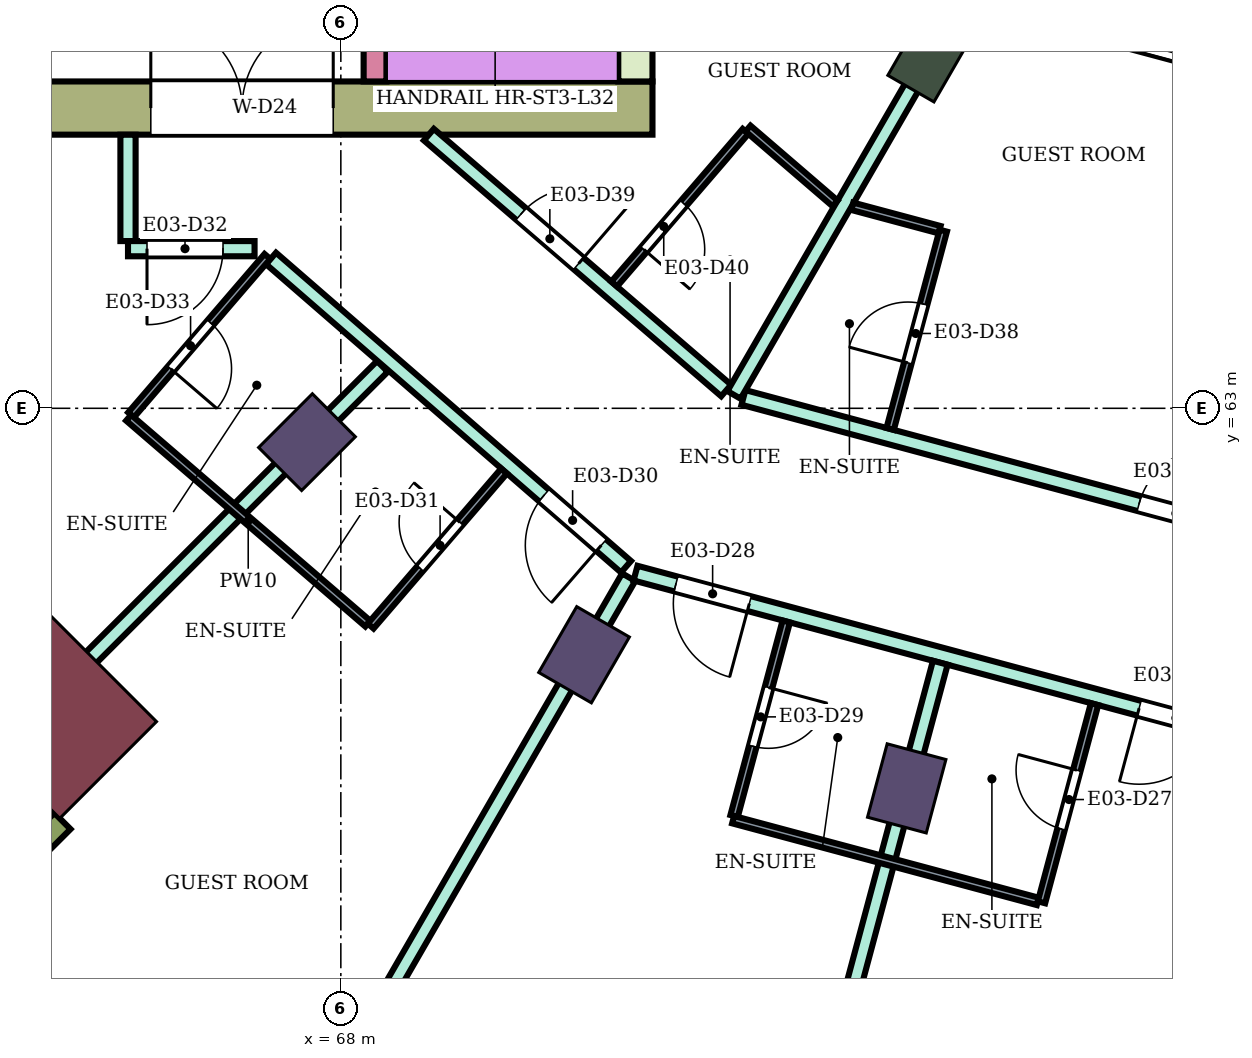
"""IFC4 building model, lengths in metres.
Left out: names, types, materials, properties, quantities, classifications, styles, units other than length and angle.
Written with IfcOpenShell. Run it as: python <this file> out.ifc"""

import sys

from ifc_helpers import new_model, si_unit, direction, frame, frame_2d, origin, origin_2d, place, context, subcontext, project, spatial, rectangle, extrude, element, fill, save


model = new_model("IFC4")
c1 = context("Model", 3, precision=1e-05, world=origin(), true_north=direction((0.0, 1.0)))
c2 = subcontext(c1, "Body", "Model", "MODEL_VIEW")
j1 = project(units=[si_unit("LENGTHUNIT", "METRE"), si_unit("PLANEANGLEUNIT", "RADIAN")], contexts=[c1])
p1 = place(None, origin())
s1 = spatial("IfcSite", under=j1, at=p1, CompositionType="ELEMENT")
p2 = place(p1, origin())
s2 = spatial("IfcBuilding", under=s1, at=p2, CompositionType="ELEMENT")
p3 = place(p2, frame((0.0, 0.0, 138.0)))
s3 = spatial("IfcBuildingStorey", under=s2, at=p3, CompositionType="ELEMENT", Elevation=138.0)
for number, where, z_axis, x_axis in (
    (1, (67.555, 62.555, 0.0), (0.0, 0.0, 1.0), (-0.707, -0.707, 0.0)),
    (2, (71.2, 59.758, 0.0), (0.0, 0.0, 1.0), (-0.5, -0.866, 0.0)),
    (3, (75.445, 58.0, 0.0), (0.0, 0.0, 1.0), (-0.259, -0.966, 0.0)),
):
    element("IfcColumn", number, at=place(p3, frame(where, z_axis=z_axis, x_axis=x_axis)), inside=s3, PredefinedType="COLUMN", context=c2, shape_type="SweptSolid", body=[
        extrude(rectangle(XDim=1.0, YDim=0.8, at=origin_2d()), origin(), (0.0, 0.0, 1.0), 3.9),
    ])
p4 = place(p3, frame((75.7, 67.552, 0.0), z_axis=(0.0, 0.0, 1.0), x_axis=(-0.5, -0.866025403784, 0.0)))
e4 = element("IfcColumn", 4, at=p4, inside=s3, PredefinedType="COLUMN", context=c2, shape_type="SweptSolid", body=[
    extrude(rectangle(XDim=0.8, YDim=0.7, at=origin_2d()), origin(), (0.0, 0.0, 1.0), 3.9),
])
p5 = place(p3, frame((64.09, 59.09, 0.0), z_axis=(0.0, 0.0, 1.0), x_axis=(-0.707106781187, -0.707106781187, 0.0)))
e5 = element("IfcColumn", 5, at=p5, inside=s3, PredefinedType="COLUMN", context=c2, shape_type="SweptSolid", body=[
    extrude(rectangle(XDim=1.8, YDim=2.4, at=origin_2d()), origin(), (0.0, 0.0, 1.0), 3.9),
])
p6 = place(p3, frame((72.1, 66.95, 0.0), z_axis=(0.0, 0.0, 1.0), x_axis=(-1.0, 0.0, 0.0)))
e6 = element("IfcWall", 6, at=p6, inside=s3, PredefinedType="SHEAR", context=c2, shape_type="SweptSolid", body=[
    extrude(rectangle(XDim=14.8, YDim=0.7, at=frame_2d((7.4, 0.0))), origin(), (0.0, 0.0, 1.0), 3.58),
])
p7 = place(p6, frame((4.2, 0.0, 0.0)))
e7 = element("IfcOpeningElement", 7, at=p7, cuts=e6, PredefinedType="OPENING", context=c2, shape_type="SweptSolid", body=[
    extrude(rectangle(XDim=2.4, YDim=2.4, at=frame_2d((1.2, 1.2))), frame((0.0, 0.36, 0.0), z_axis=(0.0, -1.0, 0.0), x_axis=(1.0, 0.0, 0.0)), (0.0, 0.0, 1.0), 0.72),
])
p8 = place(p3, frame((71.875, 75.0, 0.0), z_axis=(0.0, 0.0, 1.0), x_axis=(0.0, -1.0, 0.0)))
e8 = element("IfcWall", 8, at=p8, inside=s3, PredefinedType="SHEAR", context=c2, shape_type="SweptSolid", body=[
    extrude(rectangle(XDim=7.7, YDim=0.45, at=frame_2d((3.85, 0.0))), origin(), (0.0, 0.0, 1.0), 3.58),
])
p9 = place(p3, frame((68.45, 75.0, 0.0), z_axis=(0.0, 0.0, 1.0), x_axis=(0.0, -1.0, 0.0)))
e9 = element("IfcWall", 9, at=p9, inside=s3, PredefinedType="SHEAR", context=c2, shape_type="SweptSolid", body=[
    extrude(rectangle(XDim=7.7, YDim=0.3, at=frame_2d((3.85, 0.0))), origin(), (0.0, 0.0, 1.0), 3.58),
])
p10 = place(p9, frame((1.85, 0.0, 0.0)))
e10 = element("IfcOpeningElement", 10, at=p10, cuts=e9, PredefinedType="OPENING", context=c2, shape_type="SweptSolid", body=[
    extrude(rectangle(XDim=0.9, YDim=2.1, at=frame_2d((0.45, 1.05))), frame((0.0, 0.16, 0.0), z_axis=(0.0, -1.0, 0.0), x_axis=(1.0, 0.0, 0.0)), (0.0, 0.0, 1.0), 0.32),
])
p11 = place(p3, frame((64.338, 57.57, 0.0), z_axis=(0.0, 0.0, 1.0), x_axis=(-0.707106781187, -0.707106781187, 0.0)))
e11 = element("IfcWall", 11, at=p11, inside=s3, PredefinedType="NOTDEFINED", context=c2, shape_type="SweptSolid", body=[
    extrude(rectangle(XDim=2.416, YDim=0.3, at=frame_2d((1.208, 0.0))), origin(), (0.0, 0.0, 1.0), 3.9),
])
p12 = place(p3, frame((76.198, 68.415, 0.0), z_axis=(0.0, 0.0, 1.0), x_axis=(0.965933654434, -0.258789828301, 0.0)))
e12 = element("IfcWall", 12, at=p12, inside=s3, PredefinedType="NOTDEFINED", context=c2, shape_type="SweptSolid", body=[
    extrude(rectangle(XDim=3.936, YDim=0.2, at=frame_2d((1.968, 0.0))), origin(), (0.0, 0.0, 1.0), 3.9),
])
p13 = place(p12, frame((0.468, 0.0, 0.9)))
e13 = element("IfcOpeningElement", 13, at=p13, cuts=e12, PredefinedType="OPENING", context=c2, shape_type="SweptSolid", body=[
    extrude(rectangle(XDim=3.0, YDim=2.3, at=frame_2d((1.5, 1.15))), frame((0.0, 0.11, 0.0), z_axis=(0.0, -1.0, 0.0), x_axis=(1.0, 0.0, 0.0)), (0.0, 0.0, 1.0), 0.22),
])
p14 = place(p3, frame((63.593, 58.599, 0.0), z_axis=(0.0, 0.0, 1.0), x_axis=(0.707228748718, 0.706984792613, 0.0)))
e14 = element("IfcWall", 14, at=p14, inside=s3, PredefinedType="PARTITIONING", context=c2, shape_type="SweptSolid", body=[
    extrude(rectangle(XDim=7.005, YDim=0.2, at=frame_2d((3.503, 0.0))), origin(), (0.0, 0.0, 1.0), 3.45),
])
p15 = place(p3, frame((65.2, 65.2, 0.0), z_axis=(0.0, 0.0, 1.0), x_axis=(0.0, 1.0, 0.0)))
e15 = element("IfcWall", 15, at=p15, inside=s3, PredefinedType="PARTITIONING", context=c2, shape_type="SweptSolid", body=[
    extrude(rectangle(XDim=1.399, YDim=0.2, at=frame_2d((0.7, 0.0))), origin(), (0.0, 0.0, 1.0), 3.45),
])
p16 = place(p3, frame((65.2, 65.1, 0.0), z_axis=(0.0, 0.0, 1.0), x_axis=(1.0, 0.0, 0.0)))
e16 = element("IfcWall", 16, at=p16, inside=s3, PredefinedType="PARTITIONING", context=c2, shape_type="SweptSolid", body=[
    extrude(rectangle(XDim=1.665, YDim=0.2, at=frame_2d((0.833, 0.0))), origin(), (0.0, 0.0, 1.0), 3.45),
])
p17 = place(p16, frame((0.25, 0.0, 0.0)))
e17 = element("IfcOpeningElement", 17, at=p17, cuts=e16, PredefinedType="OPENING", context=c2, shape_type="SweptSolid", body=[
    extrude(rectangle(XDim=1.0, YDim=2.1, at=frame_2d((0.5, 1.05))), frame((0.0, 0.11, 0.0), z_axis=(0.0, -1.0, 0.0), x_axis=(1.0, 0.0, 0.0)), (0.0, 0.0, 1.0), 0.22),
])
p18 = place(p3, frame((67.082, 64.972, 0.0), z_axis=(0.0, 0.0, 1.0), x_axis=(0.755031061605, -0.65568902386, 0.0)))
e18 = element("IfcWall", 18, at=p18, inside=s3, PredefinedType="PARTITIONING", context=c2, shape_type="SweptSolid", body=[
    extrude(rectangle(XDim=6.186, YDim=0.2, at=frame_2d((3.093, 0.0))), origin(), (0.0, 0.0, 1.0), 3.45),
])
p19 = place(p18, frame((4.755, 0.0, 0.0)))
e19 = element("IfcOpeningElement", 19, at=p19, cuts=e18, PredefinedType="OPENING", context=c2, shape_type="SweptSolid", body=[
    extrude(rectangle(XDim=1.0, YDim=2.1, at=frame_2d((0.5, 1.05))), frame((0.0, 0.11, 0.0), z_axis=(0.0, -1.0, 0.0), x_axis=(1.0, 0.0, 0.0)), (0.0, 0.0, 1.0), 0.22),
])
p20 = place(p3, frame((67.097, 52.661, 0.0), z_axis=(0.0, 0.0, 1.0), x_axis=(0.500236379769, 0.865888886841, 0.0)))
e20 = element("IfcWall", 20, at=p20, inside=s3, PredefinedType="PARTITIONING", context=c2, shape_type="SweptSolid", body=[
    extrude(rectangle(XDim=9.375, YDim=0.2, at=frame_2d((4.688, 0.0))), origin(), (0.0, 0.0, 1.0), 3.45),
])
p21 = place(p3, frame((69.158, 66.6, 0.0), z_axis=(0.0, 0.0, 1.0), x_axis=(0.757976058094, -0.652282373943, 0.0)))
e21 = element("IfcWall", 21, at=p21, inside=s3, PredefinedType="PARTITIONING", context=c2, shape_type="SweptSolid", body=[
    extrude(rectangle(XDim=5.16, YDim=0.2, at=frame_2d((2.58, 0.0))), origin(), (0.0, 0.0, 1.0), 3.45),
])
p22 = place(p21, frame((1.6, 0.0, 0.0)))
e22 = element("IfcOpeningElement", 22, at=p22, cuts=e21, PredefinedType="OPENING", context=c2, shape_type="SweptSolid", body=[
    extrude(rectangle(XDim=1.0, YDim=2.1, at=frame_2d((0.5, 1.05))), frame((0.0, 0.11, 0.0), z_axis=(0.0, -1.0, 0.0), x_axis=(1.0, 0.0, 0.0)), (0.0, 0.0, 1.0), 0.22),
])
p23 = place(p3, frame((71.877, 60.832, 0.0), z_axis=(0.0, 0.0, 1.0), x_axis=(0.965852509869, -0.259092510851, 0.0)))
e23 = element("IfcWall", 23, at=p23, inside=s3, PredefinedType="PARTITIONING", context=c2, shape_type="SweptSolid", body=[
    extrude(rectangle(XDim=8.32, YDim=0.2, at=frame_2d((4.16, 0.0))), origin(), (0.0, 0.0, 1.0), 3.45),
])
p24 = place(p23, frame((6.86, 0.0, 0.0)))
e24 = element("IfcOpeningElement", 24, at=p24, cuts=e23, PredefinedType="OPENING", context=c2, shape_type="SweptSolid", body=[
    extrude(rectangle(XDim=1.0, YDim=2.1, at=frame_2d((0.5, 1.05))), frame((0.0, 0.11, 0.0), z_axis=(0.0, -1.0, 0.0), x_axis=(1.0, 0.0, 0.0)), (0.0, 0.0, 1.0), 0.22),
])
p25 = place(p23, frame((0.55, 0.0, 0.0)))
e25 = element("IfcOpeningElement", 25, at=p25, cuts=e23, PredefinedType="OPENING", context=c2, shape_type="SweptSolid", body=[
    extrude(rectangle(XDim=1.0, YDim=2.1, at=frame_2d((0.5, 1.05))), frame((0.0, 0.11, 0.0), z_axis=(0.0, -1.0, 0.0), x_axis=(1.0, 0.0, 0.0)), (0.0, 0.0, 1.0), 0.22),
])
p26 = place(p3, frame((73.297, 63.143, 0.0), z_axis=(0.0, 0.0, 1.0), x_axis=(0.965859030528, -0.25906820173, 0.0)))
e26 = element("IfcWall", 26, at=p26, inside=s3, PredefinedType="PARTITIONING", context=c2, shape_type="SweptSolid", body=[
    extrude(rectangle(XDim=6.81, YDim=0.2, at=frame_2d((3.405, 0.0))), origin(), (0.0, 0.0, 1.0), 3.45),
])
p27 = place(p26, frame((5.39, 0.0, 0.0)))
e27 = element("IfcOpeningElement", 27, at=p27, cuts=e26, PredefinedType="OPENING", context=c2, shape_type="SweptSolid", body=[
    extrude(rectangle(XDim=1.0, YDim=2.1, at=frame_2d((0.5, 1.05))), frame((0.0, 0.11, 0.0), z_axis=(0.0, -1.0, 0.0), x_axis=(1.0, 0.0, 0.0)), (0.0, 0.0, 1.0), 0.22),
])
p28 = place(p3, frame((73.173, 63.176, 0.0), z_axis=(0.0, 0.0, 1.0), x_axis=(0.500239348149, 0.865887171959, 0.0)))
e28 = element("IfcWall", 28, at=p28, inside=s3, PredefinedType="PARTITIONING", context=c2, shape_type="SweptSolid", body=[
    extrude(rectangle(XDim=5.955, YDim=0.2, at=frame_2d((2.978, 0.0))), origin(), (0.0, 0.0, 1.0), 3.45),
])
p29 = place(p3, frame((73.321, 50.081, 0.0), z_axis=(0.0, 0.0, 1.0), x_axis=(0.258889198551, 0.965907025999, 0.0)))
e29 = element("IfcWall", 29, at=p29, inside=s3, PredefinedType="PARTITIONING", context=c2, shape_type="SweptSolid", body=[
    extrude(rectangle(XDim=9.909, YDim=0.2, at=frame_2d((4.955, 0.0))), origin(), (0.0, 0.0, 1.0), 3.45),
])
p30 = place(p3, frame((65.24, 62.913, 0.0), z_axis=(0.0, 0.0, 1.0), x_axis=(0.652069888227, 0.758158862553, 0.0)))
e30 = element("IfcWall", 30, at=p30, inside=s3, PredefinedType="PARTITIONING", context=c2, shape_type="SweptSolid", body=[
    extrude(rectangle(XDim=2.75, YDim=0.1, at=frame_2d((1.375, 0.0))), origin(), (0.0, 0.0, 1.0), 3.45),
])
p31 = place(p30, frame((0.8, 0.0, 0.0)))
e31 = element("IfcOpeningElement", 31, at=p31, cuts=e30, PredefinedType="OPENING", context=c2, shape_type="SweptSolid", body=[
    extrude(rectangle(XDim=0.8, YDim=2.1, at=frame_2d((0.4, 1.05))), frame((0.0, 0.06, 0.0), z_axis=(0.0, -1.0, 0.0), x_axis=(1.0, 0.0, 0.0)), (0.0, 0.0, 1.0), 0.12),
])
p32 = place(p3, frame((65.208, 62.875, 0.0), z_axis=(0.0, 0.0, 1.0), x_axis=(0.757943251005, -0.652320495045, 0.0)))
e32 = element("IfcWall", 32, at=p32, inside=s3, PredefinedType="PARTITIONING", context=c2, shape_type="SweptSolid", body=[
    extrude(rectangle(XDim=4.151, YDim=0.1, at=frame_2d((2.076, 0.0))), origin(), (0.0, 0.0, 1.0), 3.45),
])
p33 = place(p3, frame((68.393, 60.135, 0.0), z_axis=(0.0, 0.0, 1.0), x_axis=(0.652061182569, 0.758166349944, 0.0)))
e33 = element("IfcWall", 33, at=p33, inside=s3, PredefinedType="PARTITIONING", context=c2, shape_type="SweptSolid", body=[
    extrude(rectangle(XDim=2.69, YDim=0.1, at=frame_2d((1.345, 0.0))), origin(), (0.0, 0.0, 1.0), 3.45),
])
p34 = place(p33, frame((1.0, 0.0, 0.0)))
e34 = element("IfcOpeningElement", 34, at=p34, cuts=e33, PredefinedType="OPENING", context=c2, shape_type="SweptSolid", body=[
    extrude(rectangle(XDim=0.8, YDim=2.1, at=frame_2d((0.4, 1.05))), frame((0.0, 0.06, 0.0), z_axis=(0.0, -1.0, 0.0), x_axis=(1.0, 0.0, 0.0)), (0.0, 0.0, 1.0), 0.12),
])
p35 = place(p3, frame((71.596, 64.635, 0.0), z_axis=(0.0, 0.0, 1.0), x_axis=(0.652285007511, 0.757973791748, 0.0)))
e35 = element("IfcWall", 35, at=p35, inside=s3, PredefinedType="PARTITIONING", context=c2, shape_type="SweptSolid", body=[
    extrude(rectangle(XDim=2.65, YDim=0.1, at=frame_2d((1.325, 0.0))), origin(), (0.0, 0.0, 1.0), 3.45),
])
p36 = place(p35, frame((0.6, 0.0, 0.0)))
e36 = element("IfcOpeningElement", 36, at=p36, cuts=e35, PredefinedType="OPENING", context=c2, shape_type="SweptSolid", body=[
    extrude(rectangle(XDim=0.8, YDim=2.1, at=frame_2d((0.4, 1.05))), frame((0.0, 0.06, 0.0), z_axis=(0.0, -1.0, 0.0), x_axis=(1.0, 0.0, 0.0)), (0.0, 0.0, 1.0), 0.12),
])
p37 = place(p3, frame((73.174, 57.636, 0.0), z_axis=(0.0, 0.0, 1.0), x_axis=(0.258952498977, 0.96589005755, 0.0)))
e37 = element("IfcWall", 37, at=p37, inside=s3, PredefinedType="PARTITIONING", context=c2, shape_type="SweptSolid", body=[
    extrude(rectangle(XDim=2.65, YDim=0.1, at=frame_2d((1.325, 0.0))), origin(), (0.0, 0.0, 1.0), 3.45),
])
p38 = place(p37, frame((0.95, 0.0, 0.0)))
e38 = element("IfcOpeningElement", 38, at=p38, cuts=e37, PredefinedType="OPENING", context=c2, shape_type="SweptSolid", body=[
    extrude(rectangle(XDim=0.8, YDim=2.1, at=frame_2d((0.4, 1.05))), frame((0.0, 0.06, 0.0), z_axis=(0.0, -1.0, 0.0), x_axis=(1.0, 0.0, 0.0)), (0.0, 0.0, 1.0), 0.12),
])
p39 = place(p3, frame((73.161, 57.588, 0.0), z_axis=(0.0, 0.0, 1.0), x_axis=(0.965858994467, -0.259068336173, 0.0)))
e39 = element("IfcWall", 39, at=p39, inside=s3, PredefinedType="PARTITIONING", context=c2, shape_type="SweptSolid", body=[
    extrude(rectangle(XDim=4.15, YDim=0.1, at=frame_2d((2.075, 0.0))), origin(), (0.0, 0.0, 1.0), 3.45),
])
p40 = place(p3, frame((73.357, 66.681, 0.0), z_axis=(0.0, 0.0, 1.0), x_axis=(0.758263469747, -0.651948242154, 0.0)))
e40 = element("IfcWall", 40, at=p40, inside=s3, PredefinedType="PARTITIONING", context=c2, shape_type="SweptSolid", body=[
    extrude(rectangle(XDim=1.511, YDim=0.1, at=frame_2d((0.755, 0.0))), origin(), (0.0, 0.0, 1.0), 3.45),
])
p41 = place(p3, frame((74.729, 65.657, 0.0), z_axis=(0.0, 0.0, 1.0), x_axis=(0.965948051503, -0.258736085224, 0.0)))
e41 = element("IfcWall", 41, at=p41, inside=s3, PredefinedType="PARTITIONING", context=c2, shape_type="SweptSolid", body=[
    extrude(rectangle(XDim=1.189, YDim=0.1, at=frame_2d((0.594, 0.0))), origin(), (0.0, 0.0, 1.0), 3.45),
])
p42 = place(p3, frame((75.227, 62.729, 0.0), z_axis=(0.0, 0.0, 1.0), x_axis=(0.258945475746, 0.965891940432, 0.0)))
e42 = element("IfcWall", 42, at=p42, inside=s3, PredefinedType="PARTITIONING", context=c2, shape_type="SweptSolid", body=[
    extrude(rectangle(XDim=2.7, YDim=0.1, at=frame_2d((1.35, 0.0))), origin(), (0.0, 0.0, 1.0), 3.45),
])
p43 = place(p42, frame((0.9, 0.0, 0.0)))
e43 = element("IfcOpeningElement", 43, at=p43, cuts=e42, PredefinedType="OPENING", context=c2, shape_type="SweptSolid", body=[
    extrude(rectangle(XDim=0.8, YDim=2.1, at=frame_2d((0.4, 1.05))), frame((0.0, 0.06, 0.0), z_axis=(0.0, -1.0, 0.0), x_axis=(1.0, 0.0, 0.0)), (0.0, 0.0, 1.0), 0.12),
])
p44 = place(p3, frame((77.218, 56.501, 0.0), z_axis=(0.0, 0.0, 1.0), x_axis=(0.258591408257, 0.965986792651, 0.0)))
e44 = element("IfcWall", 44, at=p44, inside=s3, PredefinedType="PARTITIONING", context=c2, shape_type="SweptSolid", body=[
    extrude(rectangle(XDim=2.699, YDim=0.1, at=frame_2d((1.35, 0.0))), origin(), (0.0, 0.0, 1.0), 3.45),
])
p45 = place(p44, frame((1.0, 0.0, 0.0)))
e45 = element("IfcOpeningElement", 45, at=p45, cuts=e44, PredefinedType="OPENING", context=c2, shape_type="SweptSolid", body=[
    extrude(rectangle(XDim=0.8, YDim=2.1, at=frame_2d((0.4, 1.05))), frame((0.0, 0.06, 0.0), z_axis=(0.0, -1.0, 0.0), x_axis=(1.0, 0.0, 0.0)), (0.0, 0.0, 1.0), 0.12),
])
p46 = place(p13, origin())
e46 = element("IfcWindow", 46, at=p46, inside=s3, PartitioningType="SINGLE_PANEL", PredefinedType="WINDOW", context=c2, shape_type="SweptSolid", body=[
    extrude(rectangle(XDim=3.0, YDim=2.3, at=frame_2d((1.5, 1.15))), frame((0.0, 0.03, 0.0), z_axis=(0.0, -1.0, 0.0), x_axis=(1.0, 0.0, 0.0)), (0.0, 0.0, 1.0), 0.06),
])
fill(e13, e46)
p47 = place(p24, frame((1.0, 0.0, 0.0), z_axis=(0.0, 0.0, 1.0), x_axis=(-1.0, 0.0, 0.0)))
e47 = element("IfcDoor", 47, at=p47, inside=s3, OperationType="SINGLE_SWING_RIGHT", PredefinedType="DOOR", context=c2, shape_type="SweptSolid", body=[
    extrude(rectangle(XDim=1.0, YDim=2.1, at=frame_2d((0.5, 1.05))), frame((0.0, 0.025, 0.0), z_axis=(0.0, -1.0, 0.0), x_axis=(1.0, 0.0, 0.0)), (0.0, 0.0, 1.0), 0.05),
])
fill(e24, e47)
p48 = place(p45, origin())
e48 = element("IfcDoor", 48, at=p48, inside=s3, OperationType="SINGLE_SWING_RIGHT", PredefinedType="DOOR", context=c2, shape_type="SweptSolid", body=[
    extrude(rectangle(XDim=0.8, YDim=2.1, at=frame_2d((0.4, 1.05))), frame((0.0, 0.025, 0.0), z_axis=(0.0, -1.0, 0.0), x_axis=(1.0, 0.0, 0.0)), (0.0, 0.0, 1.0), 0.05),
])
fill(e45, e48)
p49 = place(p25, frame((1.0, 0.0, 0.0), z_axis=(0.0, 0.0, 1.0), x_axis=(-1.0, 0.0, 0.0)))
e49 = element("IfcDoor", 49, at=p49, inside=s3, OperationType="SINGLE_SWING_LEFT", PredefinedType="DOOR", context=c2, shape_type="SweptSolid", body=[
    extrude(rectangle(XDim=1.0, YDim=2.1, at=frame_2d((0.5, 1.05))), frame((0.0, 0.025, 0.0), z_axis=(0.0, -1.0, 0.0), x_axis=(1.0, 0.0, 0.0)), (0.0, 0.0, 1.0), 0.05),
])
fill(e25, e49)
p50 = place(p38, frame((0.8, 0.0, 0.0), z_axis=(0.0, 0.0, 1.0), x_axis=(-1.0, 0.0, 0.0)))
e50 = element("IfcDoor", 50, at=p50, inside=s3, OperationType="SINGLE_SWING_LEFT", PredefinedType="DOOR", context=c2, shape_type="SweptSolid", body=[
    extrude(rectangle(XDim=0.8, YDim=2.1, at=frame_2d((0.4, 1.05))), frame((0.0, 0.025, 0.0), z_axis=(0.0, -1.0, 0.0), x_axis=(1.0, 0.0, 0.0)), (0.0, 0.0, 1.0), 0.05),
])
fill(e38, e50)
p51 = place(p19, frame((1.0, 0.0, 0.0), z_axis=(0.0, 0.0, 1.0), x_axis=(-1.0, 0.0, 0.0)))
e51 = element("IfcDoor", 51, at=p51, inside=s3, OperationType="SINGLE_SWING_LEFT", PredefinedType="DOOR", context=c2, shape_type="SweptSolid", body=[
    extrude(rectangle(XDim=1.0, YDim=2.1, at=frame_2d((0.5, 1.05))), frame((0.0, 0.025, 0.0), z_axis=(0.0, -1.0, 0.0), x_axis=(1.0, 0.0, 0.0)), (0.0, 0.0, 1.0), 0.05),
])
fill(e19, e51)
p52 = place(p34, origin())
e52 = element("IfcDoor", 52, at=p52, inside=s3, OperationType="SINGLE_SWING_RIGHT", PredefinedType="DOOR", context=c2, shape_type="SweptSolid", body=[
    extrude(rectangle(XDim=0.8, YDim=2.1, at=frame_2d((0.4, 1.05))), frame((0.0, 0.025, 0.0), z_axis=(0.0, -1.0, 0.0), x_axis=(1.0, 0.0, 0.0)), (0.0, 0.0, 1.0), 0.05),
])
fill(e34, e52)
p53 = place(p17, frame((1.0, 0.0, 0.0), z_axis=(0.0, 0.0, 1.0), x_axis=(-1.0, 0.0, 0.0)))
e53 = element("IfcDoor", 53, at=p53, inside=s3, OperationType="SINGLE_SWING_RIGHT", PredefinedType="DOOR", context=c2, shape_type="SweptSolid", body=[
    extrude(rectangle(XDim=1.0, YDim=2.1, at=frame_2d((0.5, 1.05))), frame((0.0, 0.025, 0.0), z_axis=(0.0, -1.0, 0.0), x_axis=(1.0, 0.0, 0.0)), (0.0, 0.0, 1.0), 0.05),
])
fill(e17, e53)
p54 = place(p31, frame((0.8, 0.0, 0.0), z_axis=(0.0, 0.0, 1.0), x_axis=(-1.0, 0.0, 0.0)))
e54 = element("IfcDoor", 54, at=p54, inside=s3, OperationType="SINGLE_SWING_RIGHT", PredefinedType="DOOR", context=c2, shape_type="SweptSolid", body=[
    extrude(rectangle(XDim=0.8, YDim=2.1, at=frame_2d((0.4, 1.05))), frame((0.0, 0.025, 0.0), z_axis=(0.0, -1.0, 0.0), x_axis=(1.0, 0.0, 0.0)), (0.0, 0.0, 1.0), 0.05),
])
fill(e31, e54)
p55 = place(p27, origin())
e55 = element("IfcDoor", 55, at=p55, inside=s3, OperationType="SINGLE_SWING_RIGHT", PredefinedType="DOOR", context=c2, shape_type="SweptSolid", body=[
    extrude(rectangle(XDim=1.0, YDim=2.1, at=frame_2d((0.5, 1.05))), frame((0.0, 0.025, 0.0), z_axis=(0.0, -1.0, 0.0), x_axis=(1.0, 0.0, 0.0)), (0.0, 0.0, 1.0), 0.05),
])
fill(e27, e55)
p56 = place(p43, origin())
e56 = element("IfcDoor", 56, at=p56, inside=s3, OperationType="SINGLE_SWING_LEFT", PredefinedType="DOOR", context=c2, shape_type="SweptSolid", body=[
    extrude(rectangle(XDim=0.8, YDim=2.1, at=frame_2d((0.4, 1.05))), frame((0.0, 0.025, 0.0), z_axis=(0.0, -1.0, 0.0), x_axis=(1.0, 0.0, 0.0)), (0.0, 0.0, 1.0), 0.05),
])
fill(e43, e56)
p57 = place(p22, origin())
e57 = element("IfcDoor", 57, at=p57, inside=s3, OperationType="SINGLE_SWING_RIGHT", PredefinedType="DOOR", context=c2, shape_type="SweptSolid", body=[
    extrude(rectangle(XDim=1.0, YDim=2.1, at=frame_2d((0.5, 1.05))), frame((0.0, 0.025, 0.0), z_axis=(0.0, -1.0, 0.0), x_axis=(1.0, 0.0, 0.0)), (0.0, 0.0, 1.0), 0.05),
])
fill(e22, e57)
p58 = place(p36, frame((0.8, 0.0, 0.0), z_axis=(0.0, 0.0, 1.0), x_axis=(-1.0, 0.0, 0.0)))
e58 = element("IfcDoor", 58, at=p58, inside=s3, OperationType="SINGLE_SWING_RIGHT", PredefinedType="DOOR", context=c2, shape_type="SweptSolid", body=[
    extrude(rectangle(XDim=0.8, YDim=2.1, at=frame_2d((0.4, 1.05))), frame((0.0, 0.025, 0.0), z_axis=(0.0, -1.0, 0.0), x_axis=(1.0, 0.0, 0.0)), (0.0, 0.0, 1.0), 0.05),
])
fill(e36, e58)
p59 = place(p7, frame((2.4, 0.0, 0.0), z_axis=(0.0, 0.0, 1.0), x_axis=(-1.0, 0.0, 0.0)))
e59 = element("IfcDoor", 59, at=p59, inside=s3, OperationType="DOUBLE_DOOR_SINGLE_SWING", PredefinedType="DOOR", context=c2, shape_type="SweptSolid", body=[
    extrude(rectangle(XDim=2.4, YDim=2.4, at=frame_2d((1.2, 1.2))), frame((0.0, 0.025, 0.0), z_axis=(0.0, -1.0, 0.0), x_axis=(1.0, 0.0, 0.0)), (0.0, 0.0, 1.0), 0.05),
])
fill(e7, e59)
save(model, sys.argv[1])
